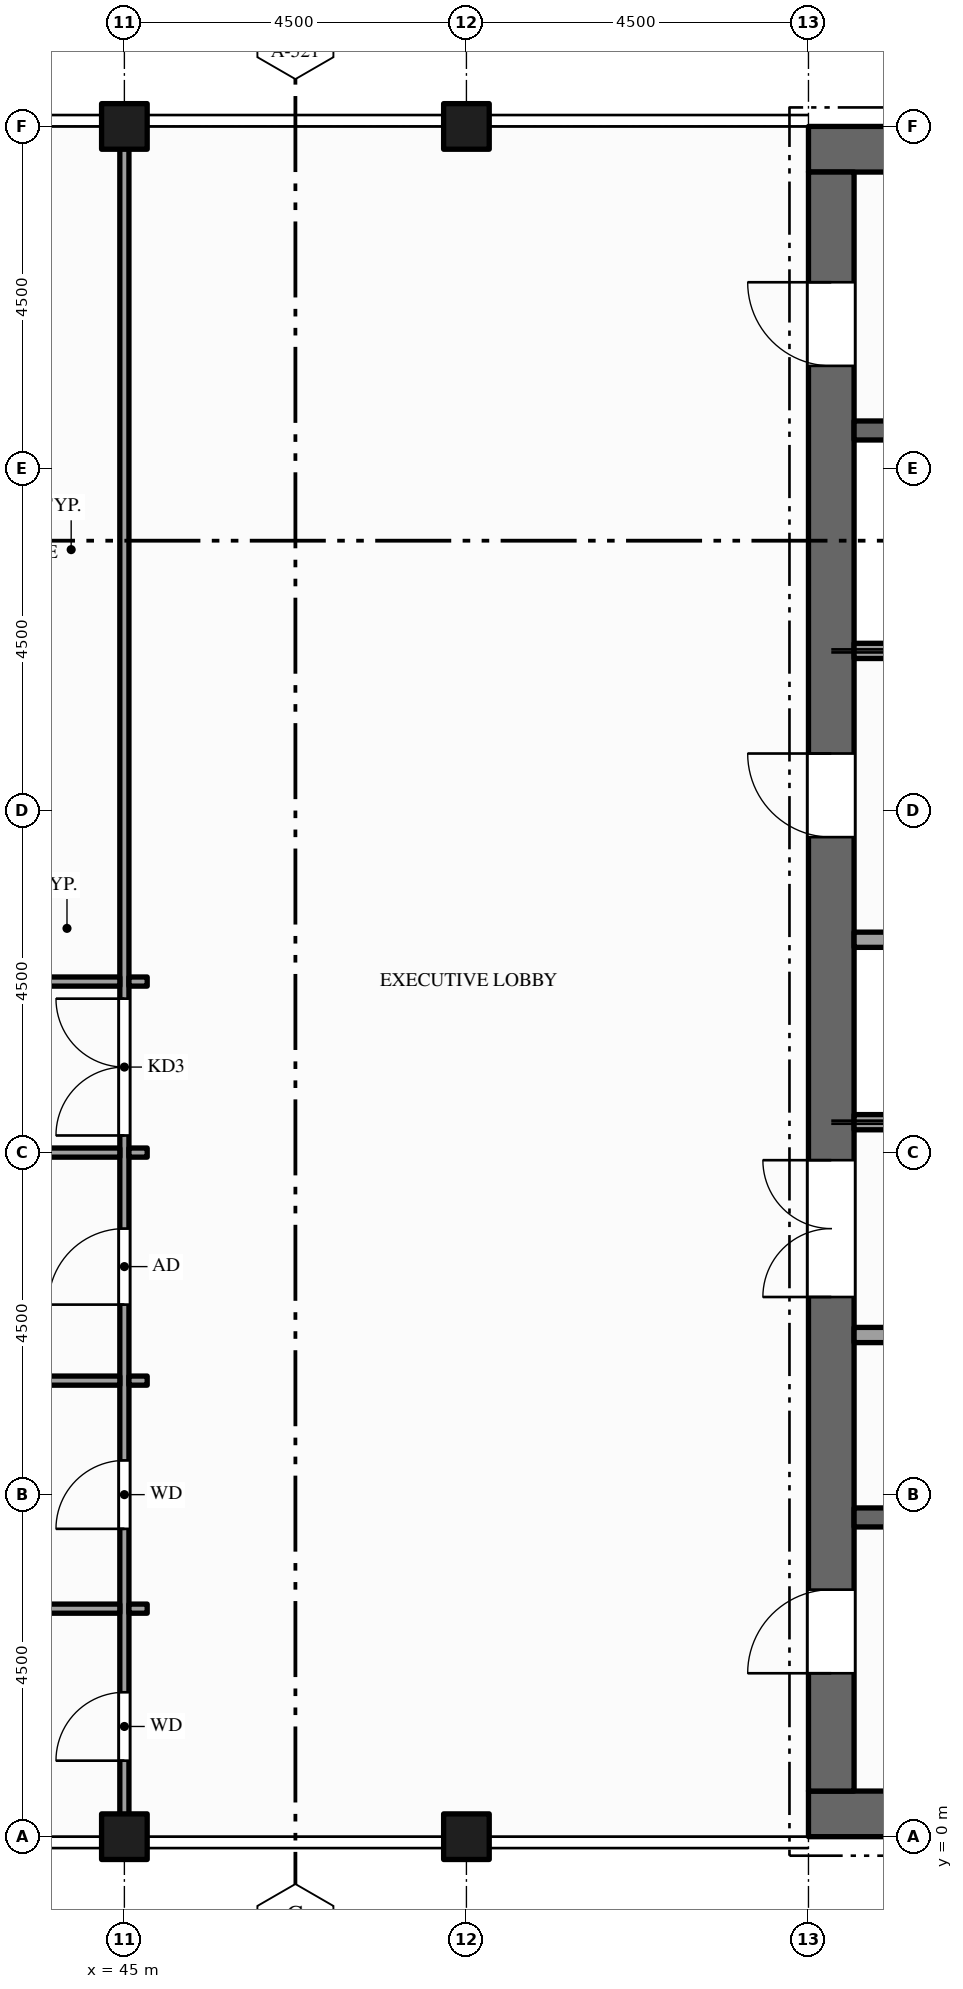
"""IFC4 building model, lengths in metres.
Left out: names, types, materials, properties, quantities, classifications, styles, units other than length and angle.
Written with IfcOpenShell. Run it as: python <this file> out.ifc"""

import sys

from ifc_helpers import new_model, si_unit, direction, frame, frame_2d, origin, origin_2d, place, context, subcontext, project, spatial, rectangle, hollow_rectangle, extrude, element, fill, save


model = new_model("IFC4")
c1 = context("Model", 3, precision=1e-05, world=origin(), true_north=direction((0.0, 1.0)))
c2 = subcontext(c1, "Body", "Model", "MODEL_VIEW")
j1 = project(units=[si_unit("LENGTHUNIT", "METRE"), si_unit("PLANEANGLEUNIT", "RADIAN")], contexts=[c1])
p1 = place(None, origin())
s1 = spatial("IfcSite", under=j1, at=p1, CompositionType="ELEMENT")
p2 = place(p1, origin())
s2 = spatial("IfcBuilding", under=s1, at=p2, CompositionType="ELEMENT")
p3 = place(p2, frame((0.0, 0.0, 305.0)))
s3 = spatial("IfcBuildingStorey", under=s2, at=p3, CompositionType="ELEMENT", Elevation=305.0)
for number, where, z_axis, x_axis in (
    (1, (67.5, 0.3, -0.15), (0.0, 0.0, 1.0), (-1.0, 0.0, 0.0)),
    (2, (54.0, 22.2, -0.15), (0.0, 0.0, 1.0), (1.0, 0.0, 0.0)),
):
    element("IfcWall", number, at=place(p3, frame(where, z_axis=z_axis, x_axis=x_axis)), inside=s3, PredefinedType="SHEAR", context=c2, shape_type="SweptSolid", body=[
        extrude(rectangle(XDim=13.5, YDim=0.6, at=frame_2d((6.75, 0.0))), origin(), (0.0, 0.0, 1.0), 4.5),
    ])
p4 = place(p3, frame((54.3, 0.6, -0.15), z_axis=(0.0, 0.0, 1.0), x_axis=(0.0, 1.0, 0.0)))
e3 = element("IfcWall", 3, at=p4, inside=s3, PredefinedType="SHEAR", context=c2, shape_type="SweptSolid", body=[
    extrude(rectangle(XDim=21.3, YDim=0.6, at=frame_2d((10.65, 0.0))), origin(), (0.0, 0.0, 1.0), 4.5),
])
p5 = place(p4, frame((6.5, 0.0, 0.15)))
e4 = element("IfcOpeningElement", 4, at=p5, cuts=e3, PredefinedType="OPENING", context=c2, shape_type="SweptSolid", body=[
    extrude(rectangle(XDim=1.8, YDim=2.1, at=frame_2d((0.9, 1.05))), frame((0.0, 0.31, 0.0), z_axis=(0.0, -1.0, 0.0), x_axis=(1.0, 0.0, 0.0)), (0.0, 0.0, 1.0), 0.62),
])
p6 = place(p4, frame((12.55, 0.0, 0.15)))
e5 = element("IfcOpeningElement", 5, at=p6, cuts=e3, PredefinedType="OPENING", context=c2, shape_type="SweptSolid", body=[
    extrude(rectangle(XDim=1.1, YDim=2.1, at=frame_2d((0.55, 1.05))), frame((0.0, 0.31, 0.0), z_axis=(0.0, -1.0, 0.0), x_axis=(1.0, 0.0, 0.0)), (0.0, 0.0, 1.0), 0.62),
])
p7 = place(p4, frame((1.55, 0.0, 0.15)))
e6 = element("IfcOpeningElement", 6, at=p7, cuts=e3, PredefinedType="OPENING", context=c2, shape_type="SweptSolid", body=[
    extrude(rectangle(XDim=1.1, YDim=2.1, at=frame_2d((0.55, 1.05))), frame((0.0, 0.31, 0.0), z_axis=(0.0, -1.0, 0.0), x_axis=(1.0, 0.0, 0.0)), (0.0, 0.0, 1.0), 0.62),
])
p8 = place(p4, frame((18.75, 0.0, 0.15)))
e7 = element("IfcOpeningElement", 7, at=p8, cuts=e3, PredefinedType="OPENING", context=c2, shape_type="SweptSolid", body=[
    extrude(rectangle(XDim=1.1, YDim=2.1, at=frame_2d((0.55, 1.05))), frame((0.0, 0.31, 0.0), z_axis=(0.0, -1.0, 0.0), x_axis=(1.0, 0.0, 0.0)), (0.0, 0.0, 1.0), 0.62),
])
for number, where, z_axis, x_axis in (
    (8, (45.0, 0.0, -0.15), (0.0, 0.0, 1.0), (1.0, 0.0, 0.0)),
    (9, (45.0, 22.5, -0.15), (0.0, 0.0, 1.0), (1.0, 0.0, 0.0)),
    (10, (49.5, 0.0, -0.15), (0.0, 0.0, 1.0), (1.0, 0.0, 0.0)),
    (11, (49.5, 22.5, -0.15), (0.0, 0.0, 1.0), (1.0, 0.0, 0.0)),
):
    element("IfcColumn", number, at=place(p3, frame(where, z_axis=z_axis, x_axis=x_axis)), inside=s3, PredefinedType="COLUMN", context=c2, shape_type="SweptSolid", body=[
        extrude(hollow_rectangle(XDim=0.6, YDim=0.6, WallThickness=0.03, at=origin_2d()), origin(), (0.0, 0.0, 1.0), 4.5),
    ])
p9 = place(p3, frame((45.0, 0.01, 0.0), z_axis=(0.0, 0.0, 1.0), x_axis=(0.0, 1.0, 0.0)))
e12 = element("IfcWall", 12, at=p9, inside=s3, PredefinedType="PARTITIONING", context=c2, shape_type="SweptSolid", body=[
    extrude(rectangle(XDim=22.48, YDim=0.12, at=frame_2d((11.24, 0.0))), origin(), (0.0, 0.0, 1.0), 3.359),
])
p10 = place(p9, frame((9.215, 0.0, 0.0)))
e13 = element("IfcOpeningElement", 13, at=p10, cuts=e12, PredefinedType="OPENING", context=c2, shape_type="SweptSolid", body=[
    extrude(rectangle(XDim=1.8, YDim=2.1, at=frame_2d((0.9, 1.05))), frame((0.0, 0.07, 0.0), z_axis=(0.0, -1.0, 0.0), x_axis=(1.0, 0.0, 0.0)), (0.0, 0.0, 1.0), 0.14),
])
p11 = place(p9, frame((0.99, 0.0, 0.0)))
e14 = element("IfcOpeningElement", 14, at=p11, cuts=e12, PredefinedType="OPENING", context=c2, shape_type="SweptSolid", body=[
    extrude(rectangle(XDim=0.9, YDim=2.1, at=frame_2d((0.45, 1.05))), frame((0.0, 0.07, 0.0), z_axis=(0.0, -1.0, 0.0), x_axis=(1.0, 0.0, 0.0)), (0.0, 0.0, 1.0), 0.14),
])
p12 = place(p9, frame((4.04, 0.0, 0.0)))
e15 = element("IfcOpeningElement", 15, at=p12, cuts=e12, PredefinedType="OPENING", context=c2, shape_type="SweptSolid", body=[
    extrude(rectangle(XDim=0.9, YDim=2.1, at=frame_2d((0.45, 1.05))), frame((0.0, 0.07, 0.0), z_axis=(0.0, -1.0, 0.0), x_axis=(1.0, 0.0, 0.0)), (0.0, 0.0, 1.0), 0.14),
])
p13 = place(p9, frame((6.99, 0.0, 0.0)))
e16 = element("IfcOpeningElement", 16, at=p13, cuts=e12, PredefinedType="OPENING", context=c2, shape_type="SweptSolid", body=[
    extrude(rectangle(XDim=1.0, YDim=2.1, at=frame_2d((0.5, 1.05))), frame((0.0, 0.07, 0.0), z_axis=(0.0, -1.0, 0.0), x_axis=(1.0, 0.0, 0.0)), (0.0, 0.0, 1.0), 0.14),
])
p14 = place(p3, frame((40.56, 3.0, 0.0), z_axis=(0.0, 0.0, 1.0), x_axis=(1.0, 0.0, 0.0)))
e17 = element("IfcWall", 17, at=p14, inside=s3, PredefinedType="PARTITIONING", context=c2, shape_type="SweptSolid", body=[
    extrude(rectangle(XDim=4.38, YDim=0.12, at=frame_2d((2.19, 0.0))), origin(), (0.0, 0.0, 1.0), 3.359),
])
p15 = place(p3, frame((45.06, 3.0, 0.0), z_axis=(0.0, 0.0, 1.0), x_axis=(1.0, 0.0, 0.0)))
e18 = element("IfcWall", 18, at=p15, inside=s3, PredefinedType="PARTITIONING", context=c2, shape_type="SweptSolid", body=[
    extrude(rectangle(XDim=0.24, YDim=0.12, at=frame_2d((0.12, 0.0))), origin(), (0.0, 0.0, 1.0), 3.359),
])
p16 = place(p3, frame((54.6, 4.2, 0.0), z_axis=(0.0, 0.0, 1.0), x_axis=(1.0, 0.0, 0.0)))
e19 = element("IfcWall", 19, at=p16, inside=s3, PredefinedType="SHEAR", context=c2, shape_type="SweptSolid", body=[
    extrude(rectangle(XDim=6.675, YDim=0.25, at=frame_2d((3.337, 0.0))), origin(), (0.0, 0.0, 1.0), 4.35),
])
p17 = place(p3, frame((40.56, 6.0, 0.0), z_axis=(0.0, 0.0, 1.0), x_axis=(1.0, 0.0, 0.0)))
e20 = element("IfcWall", 20, at=p17, inside=s3, PredefinedType="PARTITIONING", context=c2, shape_type="SweptSolid", body=[
    extrude(rectangle(XDim=4.38, YDim=0.12, at=frame_2d((2.19, 0.0))), origin(), (0.0, 0.0, 1.0), 3.359),
])
p18 = place(p3, frame((45.06, 6.0, 0.0), z_axis=(0.0, 0.0, 1.0), x_axis=(1.0, 0.0, 0.0)))
e21 = element("IfcWall", 21, at=p18, inside=s3, PredefinedType="PARTITIONING", context=c2, shape_type="SweptSolid", body=[
    extrude(rectangle(XDim=0.24, YDim=0.12, at=frame_2d((0.12, 0.0))), origin(), (0.0, 0.0, 1.0), 3.359),
])
p19 = place(p3, frame((54.6, 6.6, 0.0), z_axis=(0.0, 0.0, 1.0), x_axis=(1.0, 0.0, 0.0)))
e22 = element("IfcWall", 22, at=p19, inside=s3, PredefinedType="PARTITIONING", context=c2, shape_type="SweptSolid", body=[
    extrude(rectangle(XDim=4.9, YDim=0.2, at=frame_2d((2.45, 0.0))), origin(), (0.0, 0.0, 1.0), 4.35),
])
p20 = place(p19, frame((2.0, 0.0, 0.0)))
e23 = element("IfcOpeningElement", 23, at=p20, cuts=e22, PredefinedType="OPENING", context=c2, shape_type="SweptSolid", body=[
    extrude(rectangle(XDim=0.9, YDim=2.1, at=frame_2d((0.45, 1.05))), frame((0.0, 0.11, 0.0), z_axis=(0.0, -1.0, 0.0), x_axis=(1.0, 0.0, 0.0)), (0.0, 0.0, 1.0), 0.22),
])
p21 = place(p3, frame((40.56, 9.0, 0.0), z_axis=(0.0, 0.0, 1.0), x_axis=(1.0, 0.0, 0.0)))
e24 = element("IfcWall", 24, at=p21, inside=s3, PredefinedType="PARTITIONING", context=c2, shape_type="SweptSolid", body=[
    extrude(rectangle(XDim=4.38, YDim=0.12, at=frame_2d((2.19, 0.0))), origin(), (0.0, 0.0, 1.0), 3.359),
])
p22 = place(p3, frame((45.06, 9.0, 0.0), z_axis=(0.0, 0.0, 1.0), x_axis=(1.0, 0.0, 0.0)))
e25 = element("IfcWall", 25, at=p22, inside=s3, PredefinedType="PARTITIONING", context=c2, shape_type="SweptSolid", body=[
    extrude(rectangle(XDim=0.24, YDim=0.12, at=frame_2d((0.12, 0.0))), origin(), (0.0, 0.0, 1.0), 3.359),
])
p23 = place(p3, frame((54.6, 9.4, 0.0), z_axis=(0.0, 0.0, 1.0), x_axis=(1.0, 0.0, 0.0)))
e26 = element("IfcWall", 26, at=p23, inside=s3, PredefinedType="SOLIDWALL", context=c2, shape_type="SweptSolid", body=[
    extrude(rectangle(XDim=2.7, YDim=0.2, at=frame_2d((1.35, 0.0))), origin(), (0.0, 0.0, 1.0), 4.35),
])
p24 = place(p23, frame((0.8, 0.0, 0.012)))
e27 = element("IfcOpeningElement", 27, at=p24, cuts=e26, PredefinedType="OPENING", context=c2, shape_type="SweptSolid", body=[
    extrude(rectangle(XDim=1.1, YDim=2.1, at=frame_2d((0.55, 1.05))), frame((0.0, 0.11, 0.0), z_axis=(0.0, -1.0, 0.0), x_axis=(1.0, 0.0, 0.0)), (0.0, 0.0, 1.0), 0.22),
])
p25 = place(p3, frame((40.56, 11.25, 0.0), z_axis=(0.0, 0.0, 1.0), x_axis=(1.0, 0.0, 0.0)))
e28 = element("IfcWall", 28, at=p25, inside=s3, PredefinedType="PARTITIONING", context=c2, shape_type="SweptSolid", body=[
    extrude(rectangle(XDim=4.38, YDim=0.12, at=frame_2d((2.19, 0.0))), origin(), (0.0, 0.0, 1.0), 3.359),
])
p26 = place(p25, frame((1.74, 0.0, 0.0)))
e29 = element("IfcOpeningElement", 29, at=p26, cuts=e28, PredefinedType="OPENING", context=c2, shape_type="SweptSolid", body=[
    extrude(rectangle(XDim=0.9, YDim=2.1, at=frame_2d((0.45, 1.05))), frame((0.0, 0.07, 0.0), z_axis=(0.0, -1.0, 0.0), x_axis=(1.0, 0.0, 0.0)), (0.0, 0.0, 1.0), 0.14),
])
p27 = place(p3, frame((45.06, 11.25, 0.0), z_axis=(0.0, 0.0, 1.0), x_axis=(1.0, 0.0, 0.0)))
e30 = element("IfcWall", 30, at=p27, inside=s3, PredefinedType="PARTITIONING", context=c2, shape_type="SweptSolid", body=[
    extrude(rectangle(XDim=0.24, YDim=0.12, at=frame_2d((0.12, 0.0))), origin(), (0.0, 0.0, 1.0), 3.359),
])
p28 = place(p3, frame((54.6, 11.8, 0.0), z_axis=(0.0, 0.0, 1.0), x_axis=(1.0, 0.0, 0.0)))
e31 = element("IfcWall", 31, at=p28, inside=s3, PredefinedType="SOLIDWALL", context=c2, shape_type="SweptSolid", body=[
    extrude(rectangle(XDim=2.7, YDim=0.2, at=frame_2d((1.35, 0.0))), origin(), (0.0, 0.0, 1.0), 4.35),
])
p29 = place(p3, frame((54.6, 15.6, 0.0), z_axis=(0.0, 0.0, 1.0), x_axis=(1.0, 0.0, 0.0)))
e32 = element("IfcWall", 32, at=p29, inside=s3, PredefinedType="SOLIDWALL", context=c2, shape_type="SweptSolid", body=[
    extrude(rectangle(XDim=2.7, YDim=0.2, at=frame_2d((1.35, 0.0))), origin(), (0.0, 0.0, 1.0), 4.35),
])
p30 = place(p29, frame((0.8, 0.0, 0.012)))
e33 = element("IfcOpeningElement", 33, at=p30, cuts=e32, PredefinedType="OPENING", context=c2, shape_type="SweptSolid", body=[
    extrude(rectangle(XDim=1.1, YDim=2.1, at=frame_2d((0.55, 1.05))), frame((0.0, 0.11, 0.0), z_axis=(0.0, -1.0, 0.0), x_axis=(1.0, 0.0, 0.0)), (0.0, 0.0, 1.0), 0.22),
])
p31 = place(p3, frame((54.6, 18.5, 0.0), z_axis=(0.0, 0.0, 1.0), x_axis=(1.0, 0.0, 0.0)))
e34 = element("IfcWall", 34, at=p31, inside=s3, PredefinedType="SHEAR", context=c2, shape_type="SweptSolid", body=[
    extrude(rectangle(XDim=6.675, YDim=0.25, at=frame_2d((3.337, 0.0))), origin(), (0.0, 0.0, 1.0), 4.35),
])
p32 = place(p5, origin())
e35 = element("IfcDoor", 35, at=p32, inside=s3, OperationType="DOUBLE_DOOR_SINGLE_SWING", PredefinedType="DOOR", context=c2, shape_type="SweptSolid", body=[
    extrude(rectangle(XDim=1.8, YDim=2.1, at=frame_2d((0.9, 1.05))), frame((0.0, 0.025, 0.0), z_axis=(0.0, -1.0, 0.0), x_axis=(1.0, 0.0, 0.0)), (0.0, 0.0, 1.0), 0.05),
])
fill(e4, e35)
p33 = place(p6, origin())
e36 = element("IfcDoor", 36, at=p33, inside=s3, OperationType="SINGLE_SWING_RIGHT", PredefinedType="DOOR", context=c2, shape_type="SweptSolid", body=[
    extrude(rectangle(XDim=1.1, YDim=2.1, at=frame_2d((0.55, 1.05))), frame((0.0, 0.025, 0.0), z_axis=(0.0, -1.0, 0.0), x_axis=(1.0, 0.0, 0.0)), (0.0, 0.0, 1.0), 0.05),
])
fill(e5, e36)
p34 = place(p7, origin())
e37 = element("IfcDoor", 37, at=p34, inside=s3, OperationType="SINGLE_SWING_LEFT", PredefinedType="DOOR", context=c2, shape_type="SweptSolid", body=[
    extrude(rectangle(XDim=1.1, YDim=2.1, at=frame_2d((0.55, 1.05))), frame((0.0, 0.025, 0.0), z_axis=(0.0, -1.0, 0.0), x_axis=(1.0, 0.0, 0.0)), (0.0, 0.0, 1.0), 0.05),
])
fill(e6, e37)
p35 = place(p8, origin())
e38 = element("IfcDoor", 38, at=p35, inside=s3, OperationType="SINGLE_SWING_RIGHT", PredefinedType="DOOR", context=c2, shape_type="SweptSolid", body=[
    extrude(rectangle(XDim=1.1, YDim=2.1, at=frame_2d((0.55, 1.05))), frame((0.0, 0.025, 0.0), z_axis=(0.0, -1.0, 0.0), x_axis=(1.0, 0.0, 0.0)), (0.0, 0.0, 1.0), 0.05),
])
fill(e7, e38)
p36 = place(p10, origin())
e39 = element("IfcDoor", 39, at=p36, inside=s3, OperationType="DOUBLE_DOOR_SINGLE_SWING", PredefinedType="DOOR", context=c2, shape_type="SweptSolid", body=[
    extrude(rectangle(XDim=1.8, YDim=2.1, at=frame_2d((0.9, 1.05))), frame((0.0, 0.025, 0.0), z_axis=(0.0, -1.0, 0.0), x_axis=(1.0, 0.0, 0.0)), (0.0, 0.0, 1.0), 0.05),
])
fill(e13, e39)
p37 = place(p11, origin())
e40 = element("IfcDoor", 40, at=p37, inside=s3, OperationType="SINGLE_SWING_LEFT", PredefinedType="DOOR", context=c2, shape_type="SweptSolid", body=[
    extrude(rectangle(XDim=0.9, YDim=2.1, at=frame_2d((0.45, 1.05))), frame((0.0, 0.025, 0.0), z_axis=(0.0, -1.0, 0.0), x_axis=(1.0, 0.0, 0.0)), (0.0, 0.0, 1.0), 0.05),
])
fill(e14, e40)
p38 = place(p12, origin())
e41 = element("IfcDoor", 41, at=p38, inside=s3, OperationType="SINGLE_SWING_LEFT", PredefinedType="DOOR", context=c2, shape_type="SweptSolid", body=[
    extrude(rectangle(XDim=0.9, YDim=2.1, at=frame_2d((0.45, 1.05))), frame((0.0, 0.025, 0.0), z_axis=(0.0, -1.0, 0.0), x_axis=(1.0, 0.0, 0.0)), (0.0, 0.0, 1.0), 0.05),
])
fill(e15, e41)
p39 = place(p13, origin())
e42 = element("IfcDoor", 42, at=p39, inside=s3, OperationType="SINGLE_SWING_LEFT", PredefinedType="DOOR", context=c2, shape_type="SweptSolid", body=[
    extrude(rectangle(XDim=1.0, YDim=2.1, at=frame_2d((0.5, 1.05))), frame((0.0, 0.025, 0.0), z_axis=(0.0, -1.0, 0.0), x_axis=(1.0, 0.0, 0.0)), (0.0, 0.0, 1.0), 0.05),
])
fill(e16, e42)
save(model, sys.argv[1])
